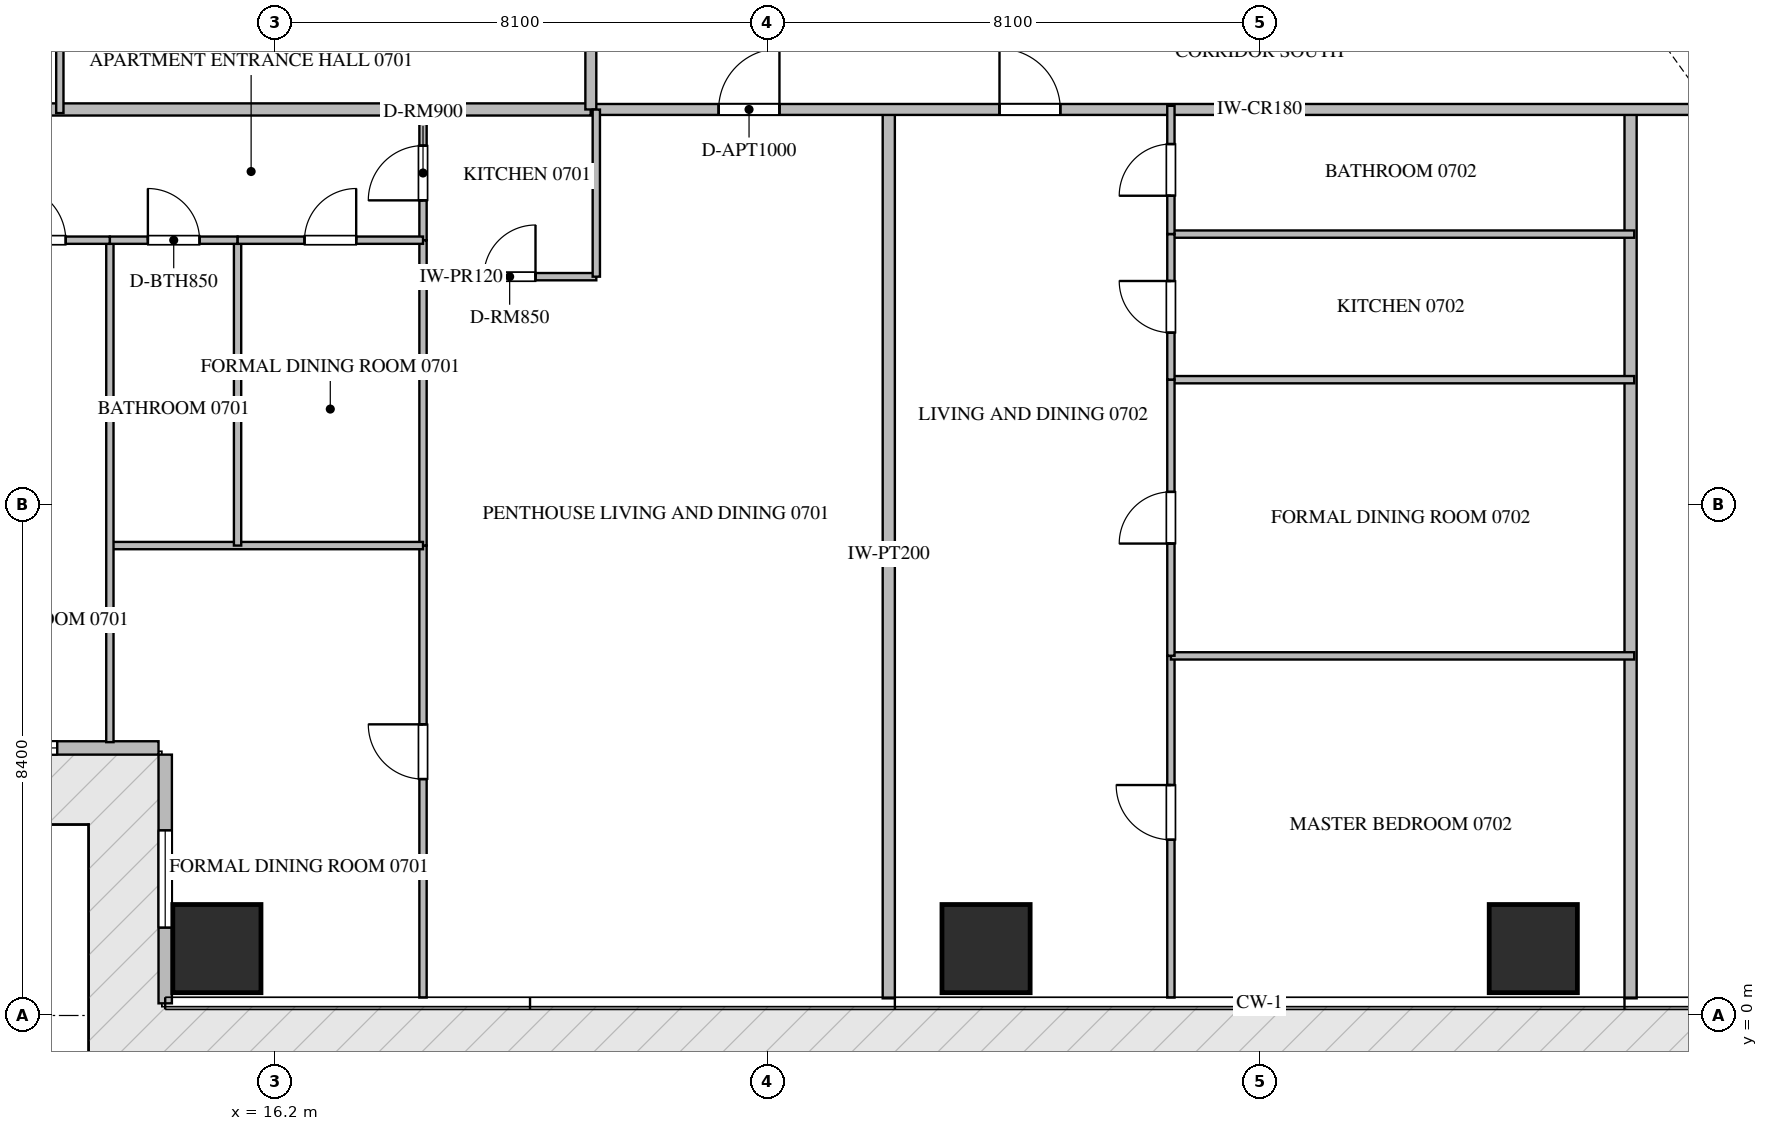
"""IFC4 building model, lengths in metres.
Left out: names, types, materials, properties, quantities, classifications, styles, units other than length and angle.
Written with IfcOpenShell. Run it as: python <this file> out.ifc"""

import sys

from ifc_helpers import new_model, si_unit, direction, frame, frame_2d, origin, origin_2d, place, context, subcontext, project, spatial, rectangle, extrude, source, transform, mapped, element, fill, save


model = new_model("IFC4")
c1 = context("Model", 3, precision=1e-05, world=origin(), true_north=direction((0.0, 1.0)))
c2 = subcontext(c1, "Body", "Model", "MODEL_VIEW")
j1 = project(units=[si_unit("LENGTHUNIT", "METRE"), si_unit("PLANEANGLEUNIT", "RADIAN")], contexts=[c1])
p1 = place(None, origin())
s1 = spatial("IfcSite", under=j1, at=p1, CompositionType="ELEMENT")
p2 = place(p1, origin())
s2 = spatial("IfcBuilding", under=s1, at=p2, CompositionType="ELEMENT")
p3 = place(p2, frame((0.0, 0.0, 34.2)))
s3 = spatial("IfcBuildingStorey", under=s2, at=p3, CompositionType="ELEMENT", Elevation=34.2)
m1 = source(origin(), c2, "Body", "SweptSolid", [
    extrude(rectangle(XDim=1.45, YDim=1.45, at=origin_2d()), origin(), (0.0, 0.0, 1.0), 3.75),
])
for number, where, z_axis, x_axis in (
    (1, (15.25, 1.1, -0.26), (0.0, 0.0, 1.0), (1.0, 0.0, 0.0)),
    (2, (27.9, 1.1, -0.26), (0.0, 0.0, 1.0), (1.0, 0.0, 0.0)),
    (3, (36.9, 1.1, -0.26), (0.0, 0.0, 1.0), (1.0, 0.0, 0.0)),
):
    element("IfcColumn", number, at=place(p3, frame(where, z_axis=z_axis, x_axis=x_axis)), inside=s3, PredefinedType="COLUMN", context=c2, shape_type="MappedRepresentation", body=[
        mapped(m1, transform((0.0, 0.0, 0.0), scale=1.0)),
    ])
p4 = place(p3, frame((10.31, 4.4, 0.0), z_axis=(0.0, 0.0, 1.0), x_axis=(1.0, 0.0, 0.0)))
e4 = element("IfcWall", 4, at=p4, inside=s3, PredefinedType="ELEMENTEDWALL", context=c2, shape_type="SweptSolid", body=[
    extrude(rectangle(XDim=3.98, YDim=0.22, at=frame_2d((1.99, 0.0))), origin(), (0.0, 0.0, 1.0), 3.475),
])
p5 = place(p4, frame((0.714, 0.0, 0.65)))
e5 = element("IfcOpeningElement", 5, at=p5, cuts=e4, PredefinedType="OPENING", context=c2, shape_type="SweptSolid", body=[
    extrude(rectangle(XDim=1.6, YDim=2.1, at=frame_2d((0.8, 1.05))), frame((0.0, 0.12, 0.0), z_axis=(0.0, -1.0, 0.0), x_axis=(1.0, 0.0, 0.0)), (0.0, 0.0, 1.0), 0.24),
])
p6 = place(p3, frame((14.4, 4.29, 0.0), z_axis=(0.0, 0.0, 1.0), x_axis=(0.0, -1.0, 0.0)))
e6 = element("IfcWall", 6, at=p6, inside=s3, PredefinedType="ELEMENTEDWALL", context=c2, shape_type="SweptSolid", body=[
    extrude(rectangle(XDim=4.09, YDim=0.22, at=frame_2d((2.045, 0.0))), origin(), (0.0, 0.0, 1.0), 3.475),
])
p7 = place(p6, frame((1.245, 0.0, 0.65)))
e7 = element("IfcOpeningElement", 7, at=p7, cuts=e6, PredefinedType="OPENING", context=c2, shape_type="SweptSolid", body=[
    extrude(rectangle(XDim=1.6, YDim=2.1, at=frame_2d((0.8, 1.05))), frame((0.0, 0.12, 0.0), z_axis=(0.0, -1.0, 0.0), x_axis=(1.0, 0.0, 0.0)), (0.0, 0.0, 1.0), 0.24),
])
for number, where, z_axis, x_axis in (
    (8, (26.3, 0.282, 0.0), (0.0, 0.0, 1.0), (0.0, 1.0, 0.0)),
    (9, (38.5, 0.282, 0.0), (0.0, 0.0, 1.0), (0.0, 1.0, 0.0)),
):
    element("IfcWall", number, at=place(p3, frame(where, z_axis=z_axis, x_axis=x_axis)), inside=s3, PredefinedType="PARTITIONING", context=c2, shape_type="SweptSolid", body=[
        extrude(rectangle(XDim=14.618, YDim=0.2, at=frame_2d((7.309, 0.0))), origin(), (0.0, 0.0, 1.0), 3.49),
    ])
p8 = place(p3, frame((6.082, 14.9, 0.0), z_axis=(0.0, 0.0, 1.0), x_axis=(1.0, 0.0, 0.0)))
e10 = element("IfcWall", 10, at=p8, inside=s3, PredefinedType="PARTITIONING", context=c2, shape_type="SweptSolid", body=[
    extrude(rectangle(XDim=15.318, YDim=0.2, at=frame_2d((7.659, 0.0))), origin(), (0.0, 0.0, 1.0), 3.49),
])
p9 = place(p3, frame((21.402, 14.9, 0.0), z_axis=(0.0, 0.0, 1.0), x_axis=(1.0, 0.0, 0.0)))
e11 = element("IfcWall", 11, at=p9, inside=s3, PredefinedType="PARTITIONING", context=c2, shape_type="SweptSolid", body=[
    extrude(rectangle(XDim=21.996, YDim=0.18, at=frame_2d((10.998, 0.0))), origin(), (0.0, 0.0, 1.0), 3.49),
])
p10 = place(p9, frame((2.1, 0.0, 0.0)))
e12 = element("IfcOpeningElement", 12, at=p10, cuts=e11, PredefinedType="OPENING", context=c2, shape_type="SweptSolid", body=[
    extrude(rectangle(XDim=1.0, YDim=2.15, at=frame_2d((0.5, 1.075))), frame((0.0, 0.1, 0.0), z_axis=(0.0, -1.0, 0.0), x_axis=(1.0, 0.0, 0.0)), (0.0, 0.0, 1.0), 0.2),
])
p11 = place(p9, frame((6.719, 0.0, 0.0)))
e13 = element("IfcOpeningElement", 13, at=p11, cuts=e11, PredefinedType="OPENING", context=c2, shape_type="SweptSolid", body=[
    extrude(rectangle(XDim=1.0, YDim=2.15, at=frame_2d((0.5, 1.075))), frame((0.0, 0.1, 0.0), z_axis=(0.0, -1.0, 0.0), x_axis=(1.0, 0.0, 0.0)), (0.0, 0.0, 1.0), 0.2),
])
p12 = place(p9, frame((18.896, 0.0, 0.0)))
e14 = element("IfcOpeningElement", 14, at=p12, cuts=e11, PredefinedType="OPENING", context=c2, shape_type="SweptSolid", body=[
    extrude(rectangle(XDim=1.0, YDim=2.15, at=frame_2d((0.5, 1.075))), frame((0.0, 0.1, 0.0), z_axis=(0.0, -1.0, 0.0), x_axis=(1.0, 0.0, 0.0)), (0.0, 0.0, 1.0), 0.2),
])
p13 = place(p3, frame((21.4, 14.9, 0.0), z_axis=(0.0, 0.0, 1.0), x_axis=(0.0, 1.0, 0.0)))
e15 = element("IfcWall", 15, at=p13, inside=s3, PredefinedType="PARTITIONING", context=c2, shape_type="SweptSolid", body=[
    extrude(rectangle(XDim=20.6, YDim=0.18, at=frame_2d((10.3, 0.0))), origin(), (0.0, 0.0, 1.0), 3.49),
])
p14 = place(p13, frame((17.64, 0.0, 0.0)))
e16 = element("IfcOpeningElement", 16, at=p14, cuts=e15, PredefinedType="OPENING", context=c2, shape_type="SweptSolid", body=[
    extrude(rectangle(XDim=1.0, YDim=2.15, at=frame_2d((0.5, 1.075))), frame((0.0, 0.1, 0.0), z_axis=(0.0, -1.0, 0.0), x_axis=(1.0, 0.0, 0.0)), (0.0, 0.0, 1.0), 0.2),
])
p15 = place(p3, frame((18.64, 12.15, 0.0), z_axis=(0.0, 0.0, 1.0), x_axis=(1.0, 0.0, 0.0)))
e17 = element("IfcWall", 17, at=p15, inside=s3, PredefinedType="PARTITIONING", context=c2, shape_type="SweptSolid", body=[
    extrude(rectangle(XDim=2.85, YDim=0.12, at=frame_2d((1.425, 0.0))), origin(), (0.0, 0.0, 1.0), 3.49),
])
p16 = place(p15, frame((1.0, 0.0, 0.0)))
e18 = element("IfcOpeningElement", 18, at=p16, cuts=e17, PredefinedType="OPENING", context=c2, shape_type="SweptSolid", body=[
    extrude(rectangle(XDim=0.85, YDim=2.1, at=frame_2d((0.425, 1.05))), frame((0.0, 0.07, 0.0), z_axis=(0.0, -1.0, 0.0), x_axis=(1.0, 0.0, 0.0)), (0.0, 0.0, 1.0), 0.14),
])
p17 = place(p3, frame((21.49, 12.15, 0.0), z_axis=(0.0, 0.0, 1.0), x_axis=(0.0, 1.0, 0.0)))
e19 = element("IfcWall", 19, at=p17, inside=s3, PredefinedType="PARTITIONING", context=c2, shape_type="SweptSolid", body=[
    extrude(rectangle(XDim=2.748, YDim=0.12, at=frame_2d((1.374, 0.0))), origin(), (0.0, 0.0, 1.0), 3.49),
])
p18 = place(p3, frame((18.64, 12.75, 0.0), z_axis=(0.0, 0.0, 1.0), x_axis=(0.0, 1.0, 0.0)))
e20 = element("IfcWall", 20, at=p18, inside=s3, PredefinedType="PARTITIONING", context=c2, shape_type="SweptSolid", body=[
    extrude(rectangle(XDim=2.21, YDim=0.12, at=frame_2d((1.105, 0.0))), origin(), (0.0, 0.0, 1.0), 3.49),
])
p19 = place(p18, frame((0.655, 0.0, 0.0)))
e21 = element("IfcOpeningElement", 21, at=p19, cuts=e20, PredefinedType="OPENING", context=c2, shape_type="SweptSolid", body=[
    extrude(rectangle(XDim=0.9, YDim=2.1, at=frame_2d((0.45, 1.05))), frame((0.0, 0.07, 0.0), z_axis=(0.0, -1.0, 0.0), x_axis=(1.0, 0.0, 0.0)), (0.0, 0.0, 1.0), 0.14),
])
p20 = place(p3, frame((18.64, 0.295, 0.0), z_axis=(0.0, 0.0, 1.0), x_axis=(0.0, 1.0, 0.0)))
e22 = element("IfcWall", 22, at=p20, inside=s3, PredefinedType="PARTITIONING", context=c2, shape_type="SweptSolid", body=[
    extrude(rectangle(XDim=7.433, YDim=0.12, at=frame_2d((3.717, 0.0))), origin(), (0.0, 0.0, 1.0), 3.49),
])
p21 = place(p20, frame((3.593, 0.0, 0.0)))
e23 = element("IfcOpeningElement", 23, at=p21, cuts=e22, PredefinedType="OPENING", context=c2, shape_type="SweptSolid", body=[
    extrude(rectangle(XDim=0.9, YDim=2.1, at=frame_2d((0.45, 1.05))), frame((0.0, 0.07, 0.0), z_axis=(0.0, -1.0, 0.0), x_axis=(1.0, 0.0, 0.0)), (0.0, 0.0, 1.0), 0.14),
])
p22 = place(p3, frame((18.64, 7.73, 0.0), z_axis=(0.0, 0.0, 1.0), x_axis=(0.0, 1.0, 0.0)))
e24 = element("IfcWall", 24, at=p22, inside=s3, PredefinedType="PARTITIONING", context=c2, shape_type="SweptSolid", body=[
    extrude(rectangle(XDim=5.018, YDim=0.12, at=frame_2d((2.509, 0.0))), origin(), (0.0, 0.0, 1.0), 3.49),
])
p23 = place(p3, frame((13.49, 7.728, 0.0), z_axis=(0.0, 0.0, 1.0), x_axis=(1.0, 0.0, 0.0)))
e25 = element("IfcWall", 25, at=p23, inside=s3, PredefinedType="PARTITIONING", context=c2, shape_type="SweptSolid", body=[
    extrude(rectangle(XDim=5.15, YDim=0.12, at=frame_2d((2.575, 0.0))), origin(), (0.0, 0.0, 1.0), 3.49),
])
p24 = place(p3, frame((13.49, 4.495, 0.0), z_axis=(0.0, 0.0, 1.0), x_axis=(0.0, 1.0, 0.0)))
e26 = element("IfcWall", 26, at=p24, inside=s3, PredefinedType="PARTITIONING", context=c2, shape_type="SweptSolid", body=[
    extrude(rectangle(XDim=8.255, YDim=0.12, at=frame_2d((4.127, 0.0))), origin(), (0.0, 0.0, 1.0), 3.49),
])
p25 = place(p3, frame((15.59, 7.728, 0.0), z_axis=(0.0, 0.0, 1.0), x_axis=(0.0, 1.0, 0.0)))
e27 = element("IfcWall", 27, at=p25, inside=s3, PredefinedType="PARTITIONING", context=c2, shape_type="SweptSolid", body=[
    extrude(rectangle(XDim=5.022, YDim=0.12, at=frame_2d((2.511, 0.0))), origin(), (0.0, 0.0, 1.0), 3.49),
])
p26 = place(p3, frame((13.49, 12.75, 0.0), z_axis=(0.0, 0.0, 1.0), x_axis=(1.0, 0.0, 0.0)))
e28 = element("IfcWall", 28, at=p26, inside=s3, PredefinedType="PARTITIONING", context=c2, shape_type="SweptSolid", body=[
    extrude(rectangle(XDim=2.1, YDim=0.12, at=frame_2d((1.05, 0.0))), origin(), (0.0, 0.0, 1.0), 3.49),
])
p27 = place(p26, frame((0.625, 0.0, 0.0)))
e29 = element("IfcOpeningElement", 29, at=p27, cuts=e28, PredefinedType="OPENING", context=c2, shape_type="SweptSolid", body=[
    extrude(rectangle(XDim=0.85, YDim=2.1, at=frame_2d((0.425, 1.05))), frame((0.0, 0.07, 0.0), z_axis=(0.0, -1.0, 0.0), x_axis=(1.0, 0.0, 0.0)), (0.0, 0.0, 1.0), 0.14),
])
p28 = place(p3, frame((15.592, 12.75, 0.0), z_axis=(0.0, 0.0, 1.0), x_axis=(1.0, 0.0, 0.0)))
e30 = element("IfcWall", 30, at=p28, inside=s3, PredefinedType="PARTITIONING", context=c2, shape_type="SweptSolid", body=[
    extrude(rectangle(XDim=3.048, YDim=0.12, at=frame_2d((1.524, 0.0))), origin(), (0.0, 0.0, 1.0), 3.49),
])
p29 = place(p28, frame((1.099, 0.0, 0.0)))
e31 = element("IfcOpeningElement", 31, at=p29, cuts=e30, PredefinedType="OPENING", context=c2, shape_type="SweptSolid", body=[
    extrude(rectangle(XDim=0.85, YDim=2.1, at=frame_2d((0.425, 1.05))), frame((0.0, 0.07, 0.0), z_axis=(0.0, -1.0, 0.0), x_axis=(1.0, 0.0, 0.0)), (0.0, 0.0, 1.0), 0.14),
])
p30 = place(p3, frame((11.14, 12.75, 0.0), z_axis=(0.0, 0.0, 1.0), x_axis=(1.0, 0.0, 0.0)))
e32 = element("IfcWall", 32, at=p30, inside=s3, PredefinedType="PARTITIONING", context=c2, shape_type="SweptSolid", body=[
    extrude(rectangle(XDim=2.348, YDim=0.12, at=frame_2d((1.174, 0.0))), origin(), (0.0, 0.0, 1.0), 3.49),
])
p31 = place(p30, frame((0.724, 0.0, 0.0)))
e33 = element("IfcOpeningElement", 33, at=p31, cuts=e32, PredefinedType="OPENING", context=c2, shape_type="SweptSolid", body=[
    extrude(rectangle(XDim=0.9, YDim=2.1, at=frame_2d((0.45, 1.05))), frame((0.0, 0.07, 0.0), z_axis=(0.0, -1.0, 0.0), x_axis=(1.0, 0.0, 0.0)), (0.0, 0.0, 1.0), 0.14),
])
p32 = place(p3, frame((30.94, 0.295, 0.0), z_axis=(0.0, 0.0, 1.0), x_axis=(0.0, 1.0, 0.0)))
e34 = element("IfcWall", 34, at=p32, inside=s3, PredefinedType="PARTITIONING", context=c2, shape_type="SweptSolid", body=[
    extrude(rectangle(XDim=5.619, YDim=0.12, at=frame_2d((2.81, 0.0))), origin(), (0.0, 0.0, 1.0), 3.49),
])
p33 = place(p32, frame((2.595, 0.0, 0.0)))
e35 = element("IfcOpeningElement", 35, at=p33, cuts=e34, PredefinedType="OPENING", context=c2, shape_type="SweptSolid", body=[
    extrude(rectangle(XDim=0.9, YDim=2.1, at=frame_2d((0.45, 1.05))), frame((0.0, 0.07, 0.0), z_axis=(0.0, -1.0, 0.0), x_axis=(1.0, 0.0, 0.0)), (0.0, 0.0, 1.0), 0.14),
])
for number, where, z_axis, x_axis in (
    (36, (30.94, 5.914, 0.0), (0.0, 0.0, 1.0), (1.0, 0.0, 0.0)),
    (37, (30.94, 10.456, 0.0), (0.0, 0.0, 1.0), (1.0, 0.0, 0.0)),
    (38, (30.94, 12.85, 0.0), (0.0, 0.0, 1.0), (1.0, 0.0, 0.0)),
):
    element("IfcWall", number, at=place(p3, frame(where, z_axis=z_axis, x_axis=x_axis)), inside=s3, PredefinedType="PARTITIONING", context=c2, shape_type="SweptSolid", body=[
        extrude(rectangle(XDim=7.62, YDim=0.12, at=frame_2d((3.81, 0.0))), origin(), (0.0, 0.0, 1.0), 3.49),
    ])
p34 = place(p3, frame((30.94, 5.916, 0.0), z_axis=(0.0, 0.0, 1.0), x_axis=(0.0, 1.0, 0.0)))
e39 = element("IfcWall", 39, at=p34, inside=s3, PredefinedType="PARTITIONING", context=c2, shape_type="SweptSolid", body=[
    extrude(rectangle(XDim=4.54, YDim=0.12, at=frame_2d((2.27, 0.0))), origin(), (0.0, 0.0, 1.0), 3.49),
])
p35 = place(p34, frame((1.845, 0.0, 0.0)))
e40 = element("IfcOpeningElement", 40, at=p35, cuts=e39, PredefinedType="OPENING", context=c2, shape_type="SweptSolid", body=[
    extrude(rectangle(XDim=0.85, YDim=2.1, at=frame_2d((0.425, 1.05))), frame((0.0, 0.07, 0.0), z_axis=(0.0, -1.0, 0.0), x_axis=(1.0, 0.0, 0.0)), (0.0, 0.0, 1.0), 0.14),
])
p36 = place(p3, frame((30.94, 10.458, 0.0), z_axis=(0.0, 0.0, 1.0), x_axis=(0.0, 1.0, 0.0)))
e41 = element("IfcWall", 41, at=p36, inside=s3, PredefinedType="PARTITIONING", context=c2, shape_type="SweptSolid", body=[
    extrude(rectangle(XDim=2.392, YDim=0.12, at=frame_2d((1.196, 0.0))), origin(), (0.0, 0.0, 1.0), 3.49),
])
p37 = place(p36, frame((0.771, 0.0, 0.0)))
e42 = element("IfcOpeningElement", 42, at=p37, cuts=e41, PredefinedType="OPENING", context=c2, shape_type="SweptSolid", body=[
    extrude(rectangle(XDim=0.85, YDim=2.1, at=frame_2d((0.425, 1.05))), frame((0.0, 0.07, 0.0), z_axis=(0.0, -1.0, 0.0), x_axis=(1.0, 0.0, 0.0)), (0.0, 0.0, 1.0), 0.14),
])
p38 = place(p3, frame((30.94, 12.852, 0.0), z_axis=(0.0, 0.0, 1.0), x_axis=(0.0, 1.0, 0.0)))
e43 = element("IfcWall", 43, at=p38, inside=s3, PredefinedType="PARTITIONING", context=c2, shape_type="SweptSolid", body=[
    extrude(rectangle(XDim=2.108, YDim=0.12, at=frame_2d((1.054, 0.0))), origin(), (0.0, 0.0, 1.0), 3.49),
])
p39 = place(p38, frame((0.629, 0.0, 0.0)))
e44 = element("IfcOpeningElement", 44, at=p39, cuts=e43, PredefinedType="OPENING", context=c2, shape_type="SweptSolid", body=[
    extrude(rectangle(XDim=0.85, YDim=2.1, at=frame_2d((0.425, 1.05))), frame((0.0, 0.07, 0.0), z_axis=(0.0, -1.0, 0.0), x_axis=(1.0, 0.0, 0.0)), (0.0, 0.0, 1.0), 0.14),
])
p40 = place(p3, frame((12.667, 14.84, 0.0), z_axis=(0.0, 0.0, 1.0), x_axis=(0.0, 1.0, 0.0)))
e45 = element("IfcWall", 45, at=p40, inside=s3, PredefinedType="PARTITIONING", context=c2, shape_type="SweptSolid", body=[
    extrude(rectangle(XDim=5.41, YDim=0.12, at=frame_2d((2.705, 0.0))), origin(), (0.0, 0.0, 1.0), 3.49),
])
m2 = source(origin(), c2, "Body", "SweptSolid", [
    extrude(rectangle(XDim=1.6, YDim=2.1, at=frame_2d((0.8, 1.05))), frame((0.0, 0.03, 0.0), z_axis=(0.0, -1.0, 0.0), x_axis=(1.0, 0.0, 0.0)), (0.0, 0.0, 1.0), 0.06),
])
p41 = place(p5, origin())
e46 = element("IfcWindow", 46, at=p41, inside=s3, PartitioningType="SINGLE_PANEL", PredefinedType="WINDOW", context=c2, shape_type="MappedRepresentation", body=[
    mapped(m2, transform((0.0, 0.0, 0.0), scale=1.0)),
])
fill(e5, e46)
p42 = place(p7, origin())
e47 = element("IfcWindow", 47, at=p42, inside=s3, PartitioningType="SINGLE_PANEL", PredefinedType="WINDOW", context=c2, shape_type="MappedRepresentation", body=[
    mapped(m2, transform((0.0, 0.0, 0.0), scale=1.0)),
])
fill(e7, e47)
m3 = source(origin(), c2, "Body", "SweptSolid", [
    extrude(rectangle(XDim=1.0, YDim=2.15, at=frame_2d((0.5, 1.075))), frame((0.0, 0.025, 0.0), z_axis=(0.0, -1.0, 0.0), x_axis=(1.0, 0.0, 0.0)), (0.0, 0.0, 1.0), 0.05),
])
p43 = place(p10, origin())
e48 = element("IfcDoor", 48, at=p43, inside=s3, OperationType="SINGLE_SWING_RIGHT", PredefinedType="DOOR", context=c2, shape_type="MappedRepresentation", body=[
    mapped(m3, transform((0.0, 0.0, 0.0), scale=1.0)),
])
fill(e12, e48)
p44 = place(p11, origin())
e49 = element("IfcDoor", 49, at=p44, inside=s3, OperationType="SINGLE_SWING_LEFT", PredefinedType="DOOR", context=c2, shape_type="MappedRepresentation", body=[
    mapped(m3, transform((0.0, 0.0, 0.0), scale=1.0)),
])
fill(e13, e49)
m4 = source(origin(), c2, "Body", "SweptSolid", [
    extrude(rectangle(XDim=0.85, YDim=2.1, at=frame_2d((0.425, 1.05))), frame((0.0, 0.025, 0.0), z_axis=(0.0, -1.0, 0.0), x_axis=(1.0, 0.0, 0.0)), (0.0, 0.0, 1.0), 0.05),
])
p45 = place(p16, origin())
e50 = element("IfcDoor", 50, at=p45, inside=s3, OperationType="SINGLE_SWING_RIGHT", PredefinedType="DOOR", context=c2, shape_type="MappedRepresentation", body=[
    mapped(m4, transform((0.0, 0.0, 0.0), scale=1.0)),
])
fill(e18, e50)
m5 = source(origin(), c2, "Body", "SweptSolid", [
    extrude(rectangle(XDim=0.9, YDim=2.1, at=frame_2d((0.45, 1.05))), frame((0.0, 0.025, 0.0), z_axis=(0.0, -1.0, 0.0), x_axis=(1.0, 0.0, 0.0)), (0.0, 0.0, 1.0), 0.05),
])
p46 = place(p19, origin())
e51 = element("IfcDoor", 51, at=p46, inside=s3, OperationType="SINGLE_SWING_LEFT", PredefinedType="DOOR", context=c2, shape_type="MappedRepresentation", body=[
    mapped(m5, transform((0.0, 0.0, 0.0), scale=1.0)),
])
fill(e21, e51)
p47 = place(p21, origin())
e52 = element("IfcDoor", 52, at=p47, inside=s3, OperationType="SINGLE_SWING_RIGHT", PredefinedType="DOOR", context=c2, shape_type="MappedRepresentation", body=[
    mapped(m5, transform((0.0, 0.0, 0.0), scale=1.0)),
])
fill(e23, e52)
p48 = place(p27, origin())
e53 = element("IfcDoor", 53, at=p48, inside=s3, OperationType="SINGLE_SWING_LEFT", PredefinedType="DOOR", context=c2, shape_type="MappedRepresentation", body=[
    mapped(m4, transform((0.0, 0.0, 0.0), scale=1.0)),
])
fill(e29, e53)
p49 = place(p29, origin())
e54 = element("IfcDoor", 54, at=p49, inside=s3, OperationType="SINGLE_SWING_RIGHT", PredefinedType="DOOR", context=c2, shape_type="MappedRepresentation", body=[
    mapped(m4, transform((0.0, 0.0, 0.0), scale=1.0)),
])
fill(e31, e54)
p50 = place(p31, origin())
e55 = element("IfcDoor", 55, at=p50, inside=s3, OperationType="SINGLE_SWING_LEFT", PredefinedType="DOOR", context=c2, shape_type="MappedRepresentation", body=[
    mapped(m5, transform((0.0, 0.0, 0.0), scale=1.0)),
])
fill(e33, e55)
p51 = place(p33, origin())
e56 = element("IfcDoor", 56, at=p51, inside=s3, OperationType="SINGLE_SWING_RIGHT", PredefinedType="DOOR", context=c2, shape_type="MappedRepresentation", body=[
    mapped(m5, transform((0.0, 0.0, 0.0), scale=1.0)),
])
fill(e35, e56)
p52 = place(p35, origin())
e57 = element("IfcDoor", 57, at=p52, inside=s3, OperationType="SINGLE_SWING_LEFT", PredefinedType="DOOR", context=c2, shape_type="MappedRepresentation", body=[
    mapped(m4, transform((0.0, 0.0, 0.0), scale=1.0)),
])
fill(e40, e57)
p53 = place(p37, origin())
e58 = element("IfcDoor", 58, at=p53, inside=s3, OperationType="SINGLE_SWING_RIGHT", PredefinedType="DOOR", context=c2, shape_type="MappedRepresentation", body=[
    mapped(m4, transform((0.0, 0.0, 0.0), scale=1.0)),
])
fill(e42, e58)
p54 = place(p39, origin())
e59 = element("IfcDoor", 59, at=p54, inside=s3, OperationType="SINGLE_SWING_LEFT", PredefinedType="DOOR", context=c2, shape_type="MappedRepresentation", body=[
    mapped(m4, transform((0.0, 0.0, 0.0), scale=1.0)),
])
fill(e44, e59)
save(model, sys.argv[1])
